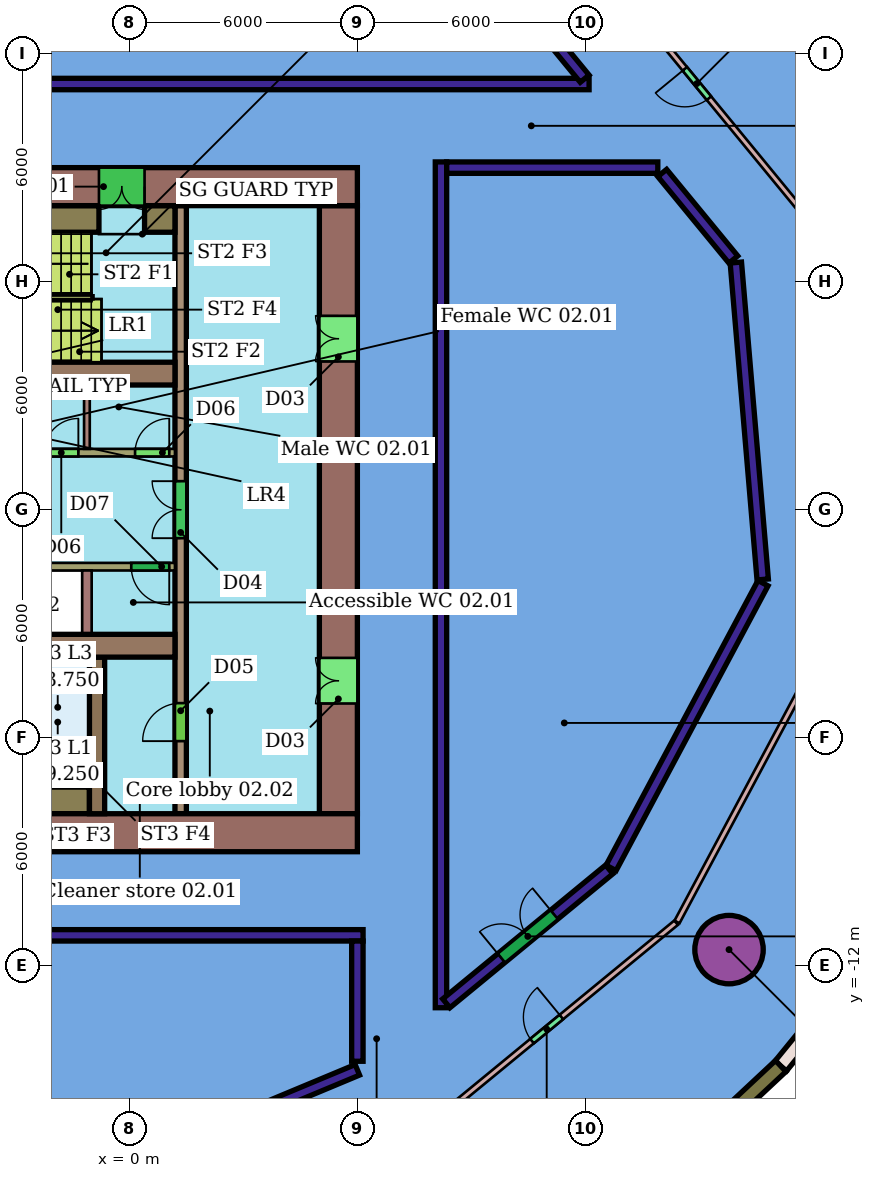
"""IFC4 building model, lengths in metres.
Left out: names, types, materials, properties, quantities, classifications, styles, units other than length and angle.
Written with IfcOpenShell. Run it as: python <this file> out.ifc"""

import sys

from ifc_helpers import new_model, si_unit, direction, frame, frame_2d, origin, origin_2d, place, context, subcontext, project, spatial, rectangle, hollow_circle, extrude, element, fill, save


model = new_model("IFC4")
c1 = context("Model", 3, precision=1e-05, world=origin(), true_north=direction((0.0, 1.0)))
c2 = subcontext(c1, "Body", "Model", "MODEL_VIEW")
j1 = project(units=[si_unit("LENGTHUNIT", "METRE"), si_unit("PLANEANGLEUNIT", "RADIAN")], contexts=[c1])
p1 = place(None, origin())
s1 = spatial("IfcSite", under=j1, at=p1, CompositionType="ELEMENT")
p2 = place(p1, origin())
s2 = spatial("IfcBuilding", under=s1, at=p2, CompositionType="ELEMENT")
p3 = place(p2, frame((0.0, 0.0, 17.0)))
s3 = spatial("IfcBuildingStorey", under=s2, at=p3, CompositionType="ELEMENT", Elevation=17.0)
p4 = place(p3, frame((15.78, -11.576, 0.0), z_axis=(0.0, 0.0, 1.0), x_axis=(1.0, 0.0, 0.0)))
e1 = element("IfcColumn", 1, at=p4, inside=s3, PredefinedType="COLUMN", context=c2, shape_type="SweptSolid", body=[
    extrude(hollow_circle(Radius=0.9, WallThickness=0.06, at=origin_2d()), origin(), (0.0, 0.0, 1.0), 8.8),
])
p5 = place(p3, frame((-9.25, 11.2, 0.0), z_axis=(0.0, 0.0, 1.0), x_axis=(1.0, 0.0, 0.0)))
e2 = element("IfcWall", 2, at=p5, inside=s3, PredefinedType="PARTITIONING", context=c2, shape_type="SweptSolid", body=[
    extrude(rectangle(XDim=21.348, YDim=0.3, at=frame_2d((10.674, 0.0))), origin(), (0.0, 0.0, 1.0), 8.35),
])
p6 = place(p3, frame((-24.097, -11.2, 0.0), z_axis=(0.0, 0.0, 1.0), x_axis=(1.0, 0.0, 0.0)))
e3 = element("IfcWall", 3, at=p6, inside=s3, PredefinedType="PARTITIONING", context=c2, shape_type="SweptSolid", body=[
    extrude(rectangle(XDim=30.248, YDim=0.3, at=frame_2d((15.124, 0.0))), origin(), (0.0, 0.0, 1.0), 8.35),
])
p7 = place(p6, frame((15.923, 0.0, 0.0)))
e4 = element("IfcOpeningElement", 4, at=p7, cuts=e3, PredefinedType="OPENING", context=c2, shape_type="SweptSolid", body=[
    extrude(rectangle(XDim=2.4, YDim=2.7, at=frame_2d((1.2, 1.35))), frame((0.0, 0.16, 0.0), z_axis=(0.0, -1.0, 0.0), x_axis=(1.0, 0.0, 0.0)), (0.0, 0.0, 1.0), 0.32),
])
p8 = place(p3, frame((8.2, -13.105, 0.0), z_axis=(0.0, 0.0, 1.0), x_axis=(0.0, 1.0, 0.0)))
e5 = element("IfcWall", 5, at=p8, inside=s3, PredefinedType="PARTITIONING", context=c2, shape_type="SweptSolid", body=[
    extrude(rectangle(XDim=22.255, YDim=0.3, at=frame_2d((11.127, 0.0))), origin(), (0.0, 0.0, 1.0), 8.35),
])
p9 = place(p3, frame((8.35, 9.0, 0.0), z_axis=(0.0, 0.0, 1.0), x_axis=(1.0, 0.0, 0.0)))
e6 = element("IfcWall", 6, at=p9, inside=s3, PredefinedType="PARTITIONING", context=c2, shape_type="SweptSolid", body=[
    extrude(rectangle(XDim=5.556, YDim=0.3, at=frame_2d((2.778, 0.0))), origin(), (0.0, 0.0, 1.0), 8.35),
])
p10 = place(p3, frame((6.0, -14.514, 0.0), z_axis=(0.0, 0.0, 1.0), x_axis=(0.0, 1.0, 0.0)))
e7 = element("IfcWall", 7, at=p10, inside=s3, PredefinedType="PARTITIONING", context=c2, shape_type="SweptSolid", body=[
    extrude(rectangle(XDim=3.164, YDim=0.3, at=frame_2d((1.582, 0.0))), origin(), (0.0, 0.0, 1.0), 8.35),
])
p11 = place(p3, frame((10.593, 13.03, 0.0), z_axis=(0.0, 0.0, 1.0), x_axis=(0.635029890501, -0.772487565058, 0.0)))
e8 = element("IfcWall", 8, at=p11, inside=s3, PredefinedType="PARTITIONING", context=c2, shape_type="SweptSolid", body=[
    extrude(rectangle(XDim=2.186, YDim=0.3, at=frame_2d((1.093, 0.0))), origin(), (0.0, 0.0, 1.0), 8.35),
])
p12 = place(p3, frame((14.022, 8.859, 0.0), z_axis=(0.0, 0.0, 1.0), x_axis=(0.635004353448, -0.7725085573, 0.0)))
e9 = element("IfcWall", 9, at=p12, inside=s3, PredefinedType="PARTITIONING", context=c2, shape_type="SweptSolid", body=[
    extrude(rectangle(XDim=2.947, YDim=0.3, at=frame_2d((1.474, 0.0))), origin(), (0.0, 0.0, 1.0), 8.35),
])
p13 = place(p3, frame((-0.513, -17.458, 0.0), z_axis=(0.0, 0.0, 1.0), x_axis=(0.922816768599, 0.385239161552, 0.0)))
e10 = element("IfcWall", 10, at=p13, inside=s3, PredefinedType="PARTITIONING", context=c2, shape_type="SweptSolid", body=[
    extrude(rectangle(XDim=7.058, YDim=0.3, at=frame_2d((3.529, 0.0))), origin(), (0.0, 0.0, 1.0), 8.35),
])
p14 = place(p3, frame((15.959, 6.502, 0.0), z_axis=(0.0, 0.0, 1.0), x_axis=(0.084484314549, -0.996424809303, 0.0)))
e11 = element("IfcWall", 11, at=p14, inside=s3, PredefinedType="PARTITIONING", context=c2, shape_type="SweptSolid", body=[
    extrude(rectangle(XDim=8.369, YDim=0.3, at=frame_2d((4.185, 0.0))), origin(), (0.0, 0.0, 1.0), 8.35),
])
p15 = place(p3, frame((12.676, -9.427, 0.0), z_axis=(0.0, 0.0, 1.0), x_axis=(0.470743396375, 0.882270171076, 0.0)))
e12 = element("IfcWall", 12, at=p15, inside=s3, PredefinedType="PARTITIONING", context=c2, shape_type="SweptSolid", body=[
    extrude(rectangle(XDim=8.493, YDim=0.3, at=frame_2d((4.247, 0.0))), origin(), (0.0, 0.0, 1.0), 8.35),
])
p16 = place(p3, frame((8.341, -12.989, 0.0), z_axis=(0.0, 0.0, 1.0), x_axis=(0.772581343642, 0.634915795564, 0.0)))
e13 = element("IfcWall", 13, at=p16, inside=s3, PredefinedType="PARTITIONING", context=c2, shape_type="SweptSolid", body=[
    extrude(rectangle(XDim=5.549, YDim=0.3, at=frame_2d((2.774, 0.0))), origin(), (0.0, 0.0, 1.0), 8.35),
])
p17 = place(p16, frame((1.875, 0.0, 0.0)))
e14 = element("IfcOpeningElement", 14, at=p17, cuts=e13, PredefinedType="OPENING", context=c2, shape_type="SweptSolid", body=[
    extrude(rectangle(XDim=1.8, YDim=2.4, at=frame_2d((0.9, 1.2))), frame((0.0, 0.16, 0.0), z_axis=(0.0, -1.0, 0.0), x_axis=(1.0, 0.0, 0.0)), (0.0, 0.0, 1.0), 0.32),
])
p18 = place(p3, frame((18.06, 7.411, 0.0), z_axis=(0.0, 0.0, 1.0), x_axis=(-0.63502168635, 0.772494309277, 0.0)))
e15 = element("IfcWall", 15, at=p18, inside=s3, PredefinedType="PARTITIONING", context=c2, shape_type="SweptSolid", body=[
    extrude(rectangle(XDim=9.59, YDim=0.15, at=frame_2d((4.795, 0.0))), origin(), (0.0, 0.0, 1.0), 8.35),
])
p19 = place(p18, frame((4.422, 0.0, 0.0)))
e16 = element("IfcOpeningElement", 16, at=p19, cuts=e15, PredefinedType="OPENING", context=c2, shape_type="SweptSolid", body=[
    extrude(rectangle(XDim=1.0, YDim=2.1, at=frame_2d((0.5, 1.05))), frame((0.0, 0.085, 0.0), z_axis=(0.0, -1.0, 0.0), x_axis=(1.0, 0.0, 0.0)), (0.0, 0.0, 1.0), 0.17),
])
p20 = place(p3, frame((7.577, -16.465, 0.0), z_axis=(0.0, 0.0, 1.0), x_axis=(0.772575830308, 0.634922504266, 0.0)))
e17 = element("IfcWall", 17, at=p20, inside=s3, PredefinedType="PARTITIONING", context=c2, shape_type="SweptSolid", body=[
    extrude(rectangle(XDim=8.815, YDim=0.15, at=frame_2d((4.407, 0.0))), origin(), (0.0, 0.0, 1.0), 8.35),
])
p21 = place(p20, frame((3.907, 0.0, 0.0)))
e18 = element("IfcOpeningElement", 18, at=p21, cuts=e17, PredefinedType="OPENING", context=c2, shape_type="SweptSolid", body=[
    extrude(rectangle(XDim=1.0, YDim=2.1, at=frame_2d((0.5, 1.05))), frame((0.0, 0.085, 0.0), z_axis=(0.0, -1.0, 0.0), x_axis=(1.0, 0.0, 0.0)), (0.0, 0.0, 1.0), 0.17),
])
p22 = place(p3, frame((14.411, -10.848, 0.0), z_axis=(0.0, 0.0, 1.0), x_axis=(0.470742429837, 0.88227068678, 0.0)))
e19 = element("IfcWall", 19, at=p22, inside=s3, PredefinedType="PARTITIONING", context=c2, shape_type="SweptSolid", body=[
    extrude(rectangle(XDim=9.532, YDim=0.15, at=frame_2d((4.766, 0.0))), origin(), (0.0, 0.0, 1.0), 8.35),
])
p23 = place(p3, frame((17.14, 14.64, 0.0), z_axis=(0.0, 0.0, 1.0), x_axis=(0.631953724698, -0.775006122453, 0.0)))
e20 = element("IfcWall", 20, at=p23, inside=s3, PredefinedType="SOLIDWALL", context=c2, shape_type="SweptSolid", body=[
    extrude(rectangle(XDim=3.367, YDim=0.4, at=frame_2d((1.684, 0.0))), origin(), (0.0, 0.0, 1.0), 8.8),
])
p24 = place(p3, frame((19.268, -12.03, 0.0), z_axis=(0.0, 0.0, 1.0), x_axis=(-0.631953724698, -0.775006122453, 0.0)))
e21 = element("IfcWall", 21, at=p24, inside=s3, PredefinedType="SOLIDWALL", context=c2, shape_type="SweptSolid", body=[
    extrude(rectangle(XDim=3.367, YDim=0.4, at=frame_2d((1.684, 0.0))), origin(), (0.0, 0.0, 1.0), 8.4),
])
p25 = place(p3, frame((17.14, -14.64, 0.0), z_axis=(0.0, 0.0, 1.0), x_axis=(-0.730641209912, -0.682761614605, 0.0)))
e22 = element("IfcWall", 22, at=p25, inside=s3, PredefinedType="SOLIDWALL", context=c2, shape_type="SweptSolid", body=[
    extrude(rectangle(XDim=3.452, YDim=0.4, at=frame_2d((1.726, 0.0))), origin(), (0.0, 0.0, 1.0), 8.8),
])
p26 = place(p3, frame((6.0, 8.5, 0.0), z_axis=(0.0, 0.0, 1.0), x_axis=(-1.0, 0.0, 0.0)))
e23 = element("IfcWall", 23, at=p26, inside=s3, PredefinedType="SHEAR", context=c2, shape_type="SweptSolid", body=[
    extrude(rectangle(XDim=12.0, YDim=1.0, at=frame_2d((6.0, 0.0))), origin(), (0.0, 0.0, 1.0), 8.7),
])
p27 = place(p26, frame((5.6, 0.0, 0.0)))
e24 = element("IfcOpeningElement", 24, at=p27, cuts=e23, PredefinedType="OPENING", context=c2, shape_type="SweptSolid", body=[
    extrude(rectangle(XDim=1.2, YDim=2.1, at=frame_2d((0.6, 1.05))), frame((0.0, 0.51, 0.0), z_axis=(0.0, -1.0, 0.0), x_axis=(1.0, 0.0, 0.0)), (0.0, 0.0, 1.0), 1.02),
])
p28 = place(p3, frame((-18.0, -8.5, 0.0), z_axis=(0.0, 0.0, 1.0), x_axis=(1.0, 0.0, 0.0)))
e25 = element("IfcWall", 25, at=p28, inside=s3, PredefinedType="SHEAR", context=c2, shape_type="SweptSolid", body=[
    extrude(rectangle(XDim=24.0, YDim=1.0, at=frame_2d((12.0, 0.0))), origin(), (0.0, 0.0, 1.0), 8.7),
])
p29 = place(p28, frame((6.0, 0.0, 0.0)))
e26 = element("IfcOpeningElement", 26, at=p29, cuts=e25, PredefinedType="OPENING", context=c2, shape_type="SweptSolid", body=[
    extrude(rectangle(XDim=1.2, YDim=2.1, at=frame_2d((0.6, 1.05))), frame((0.0, 0.51, 0.0), z_axis=(0.0, -1.0, 0.0), x_axis=(1.0, 0.0, 0.0)), (0.0, 0.0, 1.0), 1.02),
])
p30 = place(p3, frame((5.5, -8.0, 0.0), z_axis=(0.0, 0.0, 1.0), x_axis=(0.0, 1.0, 0.0)))
e27 = element("IfcWall", 27, at=p30, inside=s3, PredefinedType="SHEAR", context=c2, shape_type="SweptSolid", body=[
    extrude(rectangle(XDim=16.0, YDim=1.0, at=frame_2d((8.0, 0.0))), origin(), (0.0, 0.0, 1.0), 8.7),
])
p31 = place(p30, frame((2.9, 0.0, 0.0)))
e28 = element("IfcOpeningElement", 28, at=p31, cuts=e27, PredefinedType="OPENING", context=c2, shape_type="SweptSolid", body=[
    extrude(rectangle(XDim=1.2, YDim=2.1, at=frame_2d((0.6, 1.05))), frame((0.0, 0.51, 0.0), z_axis=(0.0, -1.0, 0.0), x_axis=(1.0, 0.0, 0.0)), (0.0, 0.0, 1.0), 1.02),
])
p32 = place(p30, frame((11.9, 0.0, 0.0)))
e29 = element("IfcOpeningElement", 29, at=p32, cuts=e27, PredefinedType="OPENING", context=c2, shape_type="SweptSolid", body=[
    extrude(rectangle(XDim=1.2, YDim=2.1, at=frame_2d((0.6, 1.05))), frame((0.0, 0.51, 0.0), z_axis=(0.0, -1.0, 0.0), x_axis=(1.0, 0.0, 0.0)), (0.0, 0.0, 1.0), 1.02),
])
for number, where, z_axis, x_axis in (
    (30, (-6.0, 3.58, 0.0), (0.0, 0.0, 1.0), (1.0, 0.0, 0.0)),
    (31, (-6.0, -3.58, 0.0), (0.0, 0.0, 1.0), (1.0, 0.0, 0.0)),
):
    element("IfcWall", number, at=place(p3, frame(where, z_axis=z_axis, x_axis=x_axis)), inside=s3, PredefinedType="SHEAR", context=c2, shape_type="SweptSolid", body=[
        extrude(rectangle(XDim=7.2, YDim=0.6, at=frame_2d((3.6, 0.0))), origin(), (0.0, 0.0, 1.0), 8.7),
    ])
p33 = place(p3, frame((1.35, -8.0, 0.0), z_axis=(0.0, 0.0, 1.0), x_axis=(0.0, 1.0, 0.0)))
e32 = element("IfcWall", 32, at=p33, inside=s3, PredefinedType="SHEAR", context=c2, shape_type="SweptSolid", body=[
    extrude(rectangle(XDim=16.0, YDim=0.3, at=frame_2d((8.0, 0.0))), origin(), (0.0, 0.0, 1.0), 8.7),
])
p34 = place(p33, frame((1.91, 0.0, 0.0)))
e33 = element("IfcOpeningElement", 33, at=p34, cuts=e32, PredefinedType="OPENING", context=c2, shape_type="SweptSolid", body=[
    extrude(rectangle(XDim=1.0, YDim=2.1, at=frame_2d((0.5, 1.05))), frame((0.0, 0.16, 0.0), z_axis=(0.0, -1.0, 0.0), x_axis=(1.0, 0.0, 0.0)), (0.0, 0.0, 1.0), 0.32),
])
p35 = place(p33, frame((7.25, 0.0, 0.0)))
e34 = element("IfcOpeningElement", 34, at=p35, cuts=e32, PredefinedType="OPENING", context=c2, shape_type="SweptSolid", body=[
    extrude(rectangle(XDim=1.5, YDim=2.1, at=frame_2d((0.75, 1.05))), frame((0.0, 0.16, 0.0), z_axis=(0.0, -1.0, 0.0), x_axis=(1.0, 0.0, 0.0)), (0.0, 0.0, 1.0), 0.32),
])
p36 = place(p3, frame((-13.2, 1.5, 0.0), z_axis=(0.0, 0.0, 1.0), x_axis=(1.0, 0.0, 0.0)))
e35 = element("IfcWall", 35, at=p36, inside=s3, PredefinedType="SHEAR", context=c2, shape_type="SweptSolid", body=[
    extrude(rectangle(XDim=14.4, YDim=0.2, at=frame_2d((7.2, 0.0))), origin(), (0.0, 0.0, 1.0), 8.7),
])
p37 = place(p36, frame((0.546, 0.0, 0.0)))
e36 = element("IfcOpeningElement", 36, at=p37, cuts=e35, PredefinedType="OPENING", context=c2, shape_type="SweptSolid", body=[
    extrude(rectangle(XDim=1.1, YDim=2.1, at=frame_2d((0.55, 1.05))), frame((0.0, 0.11, 0.0), z_axis=(0.0, -1.0, 0.0), x_axis=(1.0, 0.0, 0.0)), (0.0, 0.0, 1.0), 0.22),
])
p38 = place(p36, frame((2.988, 0.0, 0.0)))
e37 = element("IfcOpeningElement", 37, at=p38, cuts=e35, PredefinedType="OPENING", context=c2, shape_type="SweptSolid", body=[
    extrude(rectangle(XDim=1.1, YDim=2.1, at=frame_2d((0.55, 1.05))), frame((0.0, 0.11, 0.0), z_axis=(0.0, -1.0, 0.0), x_axis=(1.0, 0.0, 0.0)), (0.0, 0.0, 1.0), 0.22),
])
p39 = place(p36, frame((5.429, 0.0, 0.0)))
e38 = element("IfcOpeningElement", 38, at=p39, cuts=e35, PredefinedType="OPENING", context=c2, shape_type="SweptSolid", body=[
    extrude(rectangle(XDim=1.1, YDim=2.1, at=frame_2d((0.55, 1.05))), frame((0.0, 0.11, 0.0), z_axis=(0.0, -1.0, 0.0), x_axis=(1.0, 0.0, 0.0)), (0.0, 0.0, 1.0), 0.22),
])
p40 = place(p36, frame((7.871, 0.0, 0.0)))
e39 = element("IfcOpeningElement", 39, at=p40, cuts=e35, PredefinedType="OPENING", context=c2, shape_type="SweptSolid", body=[
    extrude(rectangle(XDim=1.1, YDim=2.1, at=frame_2d((0.55, 1.05))), frame((0.0, 0.11, 0.0), z_axis=(0.0, -1.0, 0.0), x_axis=(1.0, 0.0, 0.0)), (0.0, 0.0, 1.0), 0.22),
])
p41 = place(p36, frame((10.958, 0.0, 0.0)))
e40 = element("IfcOpeningElement", 40, at=p41, cuts=e35, PredefinedType="OPENING", context=c2, shape_type="SweptSolid", body=[
    extrude(rectangle(XDim=0.9, YDim=2.1, at=frame_2d((0.45, 1.05))), frame((0.0, 0.11, 0.0), z_axis=(0.0, -1.0, 0.0), x_axis=(1.0, 0.0, 0.0)), (0.0, 0.0, 1.0), 0.22),
])
p42 = place(p36, frame((13.35, 0.0, 0.0)))
e41 = element("IfcOpeningElement", 41, at=p42, cuts=e35, PredefinedType="OPENING", context=c2, shape_type="SweptSolid", body=[
    extrude(rectangle(XDim=0.9, YDim=2.1, at=frame_2d((0.45, 1.05))), frame((0.0, 0.11, 0.0), z_axis=(0.0, -1.0, 0.0), x_axis=(1.0, 0.0, 0.0)), (0.0, 0.0, 1.0), 0.22),
])
p43 = place(p3, frame((1.2, -1.5, 0.0), z_axis=(0.0, 0.0, 1.0), x_axis=(-1.0, 0.0, 0.0)))
e42 = element("IfcWall", 42, at=p43, inside=s3, PredefinedType="SHEAR", context=c2, shape_type="SweptSolid", body=[
    extrude(rectangle(XDim=14.4, YDim=0.2, at=frame_2d((7.2, 0.0))), origin(), (0.0, 0.0, 1.0), 8.7),
])
p44 = place(p43, frame((7.821, 0.0, 0.0)))
e43 = element("IfcOpeningElement", 43, at=p44, cuts=e42, PredefinedType="OPENING", context=c2, shape_type="SweptSolid", body=[
    extrude(rectangle(XDim=1.2, YDim=2.1, at=frame_2d((0.6, 1.05))), frame((0.0, 0.11, 0.0), z_axis=(0.0, -1.0, 0.0), x_axis=(1.0, 0.0, 0.0)), (0.0, 0.0, 1.0), 0.22),
])
p45 = place(p43, frame((0.15, 0.0, 0.0)))
e44 = element("IfcOpeningElement", 44, at=p45, cuts=e42, PredefinedType="OPENING", context=c2, shape_type="SweptSolid", body=[
    extrude(rectangle(XDim=1.0, YDim=2.1, at=frame_2d((0.5, 1.05))), frame((0.0, 0.11, 0.0), z_axis=(0.0, -1.0, 0.0), x_axis=(1.0, 0.0, 0.0)), (0.0, 0.0, 1.0), 0.22),
])
p46 = place(p3, frame((-0.85, -3.88, 0.0), z_axis=(0.0, 0.0, 1.0), x_axis=(0.0, -1.0, 0.0)))
e45 = element("IfcWall", 45, at=p46, inside=s3, PredefinedType="SHEAR", context=c2, shape_type="SweptSolid", body=[
    extrude(rectangle(XDim=4.12, YDim=0.4, at=frame_2d((2.06, 0.0))), origin(), (0.0, 0.0, 1.0), 8.7),
])
p47 = place(p3, frame((-5.85, 7.65, 0.0), z_axis=(0.0, 0.0, 1.0), x_axis=(1.0, 0.0, 0.0)))
e46 = element("IfcWall", 46, at=p47, inside=s3, PredefinedType="SHEAR", context=c2, shape_type="SweptSolid", body=[
    extrude(rectangle(XDim=5.05, YDim=0.7, at=frame_2d((2.525, 0.0))), origin(), (0.0, 0.0, 1.0), 8.7),
])
p48 = place(p3, frame((0.4, 7.65, 0.0), z_axis=(0.0, 0.0, 1.0), x_axis=(1.0, 0.0, 0.0)))
e47 = element("IfcWall", 47, at=p48, inside=s3, PredefinedType="SHEAR", context=c2, shape_type="SweptSolid", body=[
    extrude(rectangle(XDim=0.8, YDim=0.7, at=frame_2d((0.4, 0.0))), origin(), (0.0, 0.0, 1.0), 8.7),
])
p49 = place(p3, frame((-8.1, -7.65, 0.0), z_axis=(0.0, 0.0, 1.0), x_axis=(1.0, 0.0, 0.0)))
e48 = element("IfcWall", 48, at=p49, inside=s3, PredefinedType="SHEAR", context=c2, shape_type="SweptSolid", body=[
    extrude(rectangle(XDim=7.05, YDim=0.7, at=frame_2d((3.525, 0.0))), origin(), (0.0, 0.0, 1.0), 8.7),
])
p50 = place(p3, frame((-1.117, 1.6, 0.0), z_axis=(0.0, 0.0, 1.0), x_axis=(0.0, 1.0, 0.0)))
e49 = element("IfcWall", 49, at=p50, inside=s3, PredefinedType="PARTITIONING", context=c2, shape_type="SweptSolid", body=[
    extrude(rectangle(XDim=1.68, YDim=0.15, at=frame_2d((0.84, 0.0))), origin(), (0.0, 0.0, 1.0), 8.7),
])
p51 = place(p3, frame((-1.117, -1.6, 0.0), z_axis=(0.0, 0.0, 1.0), x_axis=(0.0, -1.0, 0.0)))
e50 = element("IfcWall", 50, at=p51, inside=s3, PredefinedType="SHEAR", context=c2, shape_type="SweptSolid", body=[
    extrude(rectangle(XDim=1.68, YDim=0.25, at=frame_2d((0.84, 0.0))), origin(), (0.0, 0.0, 1.0), 8.7),
])
p52 = place(p17, origin())
e51 = element("IfcDoor", 51, at=p52, inside=s3, OperationType="DOUBLE_DOOR_SINGLE_SWING", PredefinedType="DOOR", context=c2, shape_type="SweptSolid", body=[
    extrude(rectangle(XDim=1.8, YDim=2.4, at=frame_2d((0.9, 1.2))), frame((0.0, 0.025, 0.0), z_axis=(0.0, -1.0, 0.0), x_axis=(1.0, 0.0, 0.0)), (0.0, 0.0, 1.0), 0.05),
])
fill(e14, e51)
p53 = place(p19, origin())
e52 = element("IfcDoor", 52, at=p53, inside=s3, OperationType="SINGLE_SWING_RIGHT", PredefinedType="DOOR", context=c2, shape_type="SweptSolid", body=[
    extrude(rectangle(XDim=1.0, YDim=2.1, at=frame_2d((0.5, 1.05))), frame((0.0, 0.025, 0.0), z_axis=(0.0, -1.0, 0.0), x_axis=(1.0, 0.0, 0.0)), (0.0, 0.0, 1.0), 0.05),
])
fill(e16, e52)
p54 = place(p21, origin())
e53 = element("IfcDoor", 53, at=p54, inside=s3, OperationType="SINGLE_SWING_RIGHT", PredefinedType="DOOR", context=c2, shape_type="SweptSolid", body=[
    extrude(rectangle(XDim=1.0, YDim=2.1, at=frame_2d((0.5, 1.05))), frame((0.0, 0.025, 0.0), z_axis=(0.0, -1.0, 0.0), x_axis=(1.0, 0.0, 0.0)), (0.0, 0.0, 1.0), 0.05),
])
fill(e18, e53)
p55 = place(p27, origin())
e54 = element("IfcDoor", 54, at=p55, inside=s3, OperationType="DOUBLE_DOOR_SINGLE_SWING", PredefinedType="NOTDEFINED", context=c2, shape_type="SweptSolid", body=[
    extrude(rectangle(XDim=1.2, YDim=2.1, at=frame_2d((0.6, 1.05))), frame((0.0, 0.025, 0.0), z_axis=(0.0, -1.0, 0.0), x_axis=(1.0, 0.0, 0.0)), (0.0, 0.0, 1.0), 0.05),
])
fill(e24, e54)
p56 = place(p31, origin())
e55 = element("IfcDoor", 55, at=p56, inside=s3, OperationType="DOUBLE_DOOR_SINGLE_SWING", PredefinedType="NOTDEFINED", context=c2, shape_type="SweptSolid", body=[
    extrude(rectangle(XDim=1.2, YDim=2.1, at=frame_2d((0.6, 1.05))), frame((0.0, 0.025, 0.0), z_axis=(0.0, -1.0, 0.0), x_axis=(1.0, 0.0, 0.0)), (0.0, 0.0, 1.0), 0.05),
])
fill(e28, e55)
p57 = place(p32, origin())
e56 = element("IfcDoor", 56, at=p57, inside=s3, OperationType="DOUBLE_DOOR_SINGLE_SWING", PredefinedType="NOTDEFINED", context=c2, shape_type="SweptSolid", body=[
    extrude(rectangle(XDim=1.2, YDim=2.1, at=frame_2d((0.6, 1.05))), frame((0.0, 0.025, 0.0), z_axis=(0.0, -1.0, 0.0), x_axis=(1.0, 0.0, 0.0)), (0.0, 0.0, 1.0), 0.05),
])
fill(e29, e56)
p58 = place(p34, origin())
e57 = element("IfcDoor", 57, at=p58, inside=s3, OperationType="SINGLE_SWING_LEFT", PredefinedType="NOTDEFINED", context=c2, shape_type="SweptSolid", body=[
    extrude(rectangle(XDim=1.0, YDim=2.1, at=frame_2d((0.5, 1.05))), frame((0.0, 0.025, 0.0), z_axis=(0.0, -1.0, 0.0), x_axis=(1.0, 0.0, 0.0)), (0.0, 0.0, 1.0), 0.05),
])
fill(e33, e57)
p59 = place(p35, origin())
e58 = element("IfcDoor", 58, at=p59, inside=s3, OperationType="DOUBLE_DOOR_SINGLE_SWING", PredefinedType="NOTDEFINED", context=c2, shape_type="SweptSolid", body=[
    extrude(rectangle(XDim=1.5, YDim=2.1, at=frame_2d((0.75, 1.05))), frame((0.0, 0.025, 0.0), z_axis=(0.0, -1.0, 0.0), x_axis=(1.0, 0.0, 0.0)), (0.0, 0.0, 1.0), 0.05),
])
fill(e34, e58)
p60 = place(p41, origin())
e59 = element("IfcDoor", 59, at=p60, inside=s3, OperationType="SINGLE_SWING_RIGHT", PredefinedType="NOTDEFINED", context=c2, shape_type="SweptSolid", body=[
    extrude(rectangle(XDim=0.9, YDim=2.1, at=frame_2d((0.45, 1.05))), frame((0.0, 0.025, 0.0), z_axis=(0.0, -1.0, 0.0), x_axis=(1.0, 0.0, 0.0)), (0.0, 0.0, 1.0), 0.05),
])
fill(e40, e59)
p61 = place(p42, origin())
e60 = element("IfcDoor", 60, at=p61, inside=s3, OperationType="SINGLE_SWING_RIGHT", PredefinedType="NOTDEFINED", context=c2, shape_type="SweptSolid", body=[
    extrude(rectangle(XDim=0.9, YDim=2.1, at=frame_2d((0.45, 1.05))), frame((0.0, 0.025, 0.0), z_axis=(0.0, -1.0, 0.0), x_axis=(1.0, 0.0, 0.0)), (0.0, 0.0, 1.0), 0.05),
])
fill(e41, e60)
p62 = place(p45, origin())
e61 = element("IfcDoor", 61, at=p62, inside=s3, OperationType="SINGLE_SWING_LEFT", PredefinedType="NOTDEFINED", context=c2, shape_type="SweptSolid", body=[
    extrude(rectangle(XDim=1.0, YDim=2.1, at=frame_2d((0.5, 1.05))), frame((0.0, 0.025, 0.0), z_axis=(0.0, -1.0, 0.0), x_axis=(1.0, 0.0, 0.0)), (0.0, 0.0, 1.0), 0.05),
])
fill(e44, e61)
save(model, sys.argv[1])
